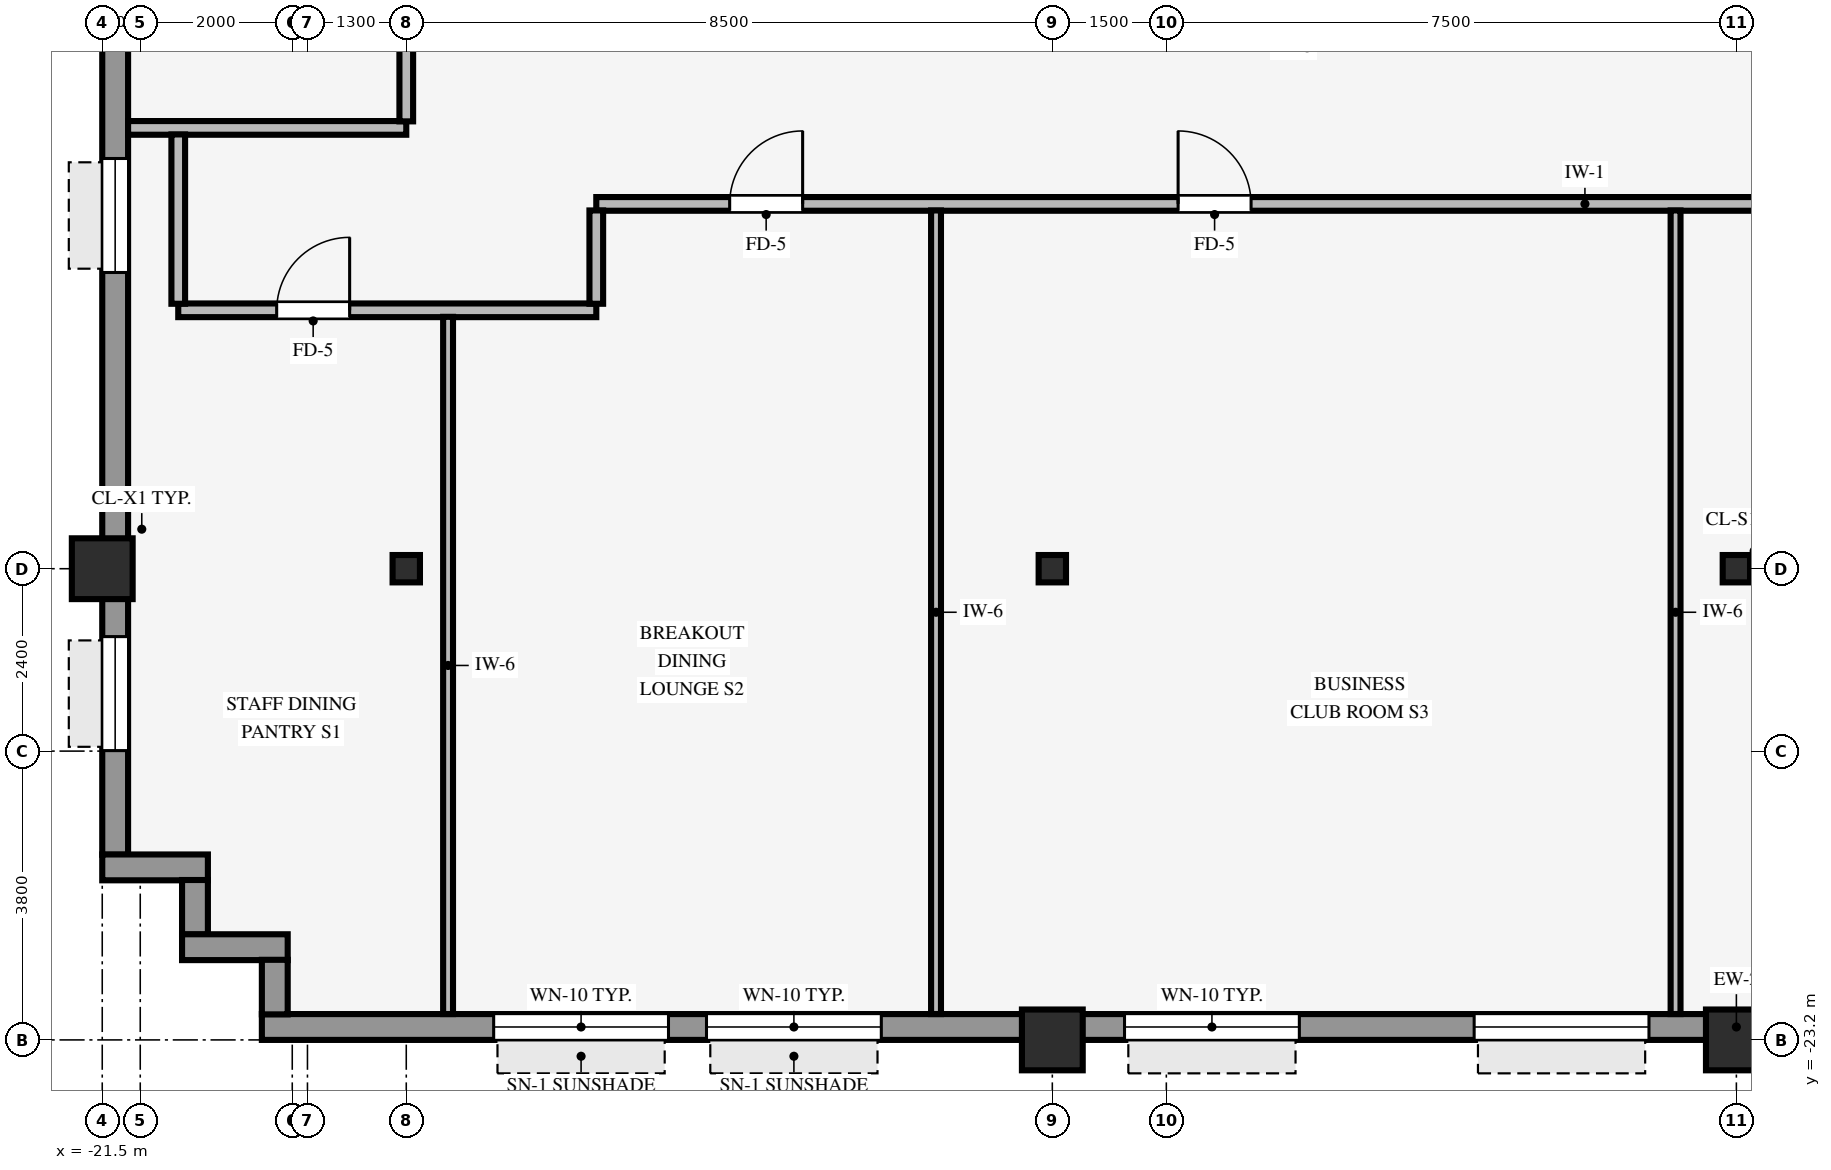
"""IFC4 building model, lengths in metres.
Left out: names, types, materials, properties, quantities, classifications, styles, units other than length and angle.
Written with IfcOpenShell. Run it as: python <this file> out.ifc"""

import sys

from ifc_helpers import new_model, si_unit, direction, frame, frame_2d, origin, origin_2d, place, context, subcontext, project, spatial, rectangle, hollow_rectangle, i_section, extrude, source, transform, mapped, element, fill, save


model = new_model("IFC4")
c1 = context("Model", 3, precision=1e-05, world=origin(), true_north=direction((0.0, 1.0)))
c2 = subcontext(c1, "Body", "Model", "MODEL_VIEW")
j1 = project(units=[si_unit("LENGTHUNIT", "METRE"), si_unit("PLANEANGLEUNIT", "RADIAN")], contexts=[c1])
p1 = place(None, origin())
s1 = spatial("IfcSite", under=j1, at=p1, CompositionType="ELEMENT")
p2 = place(p1, origin())
s2 = spatial("IfcBuilding", under=s1, at=p2, CompositionType="ELEMENT")
p3 = place(p2, frame((0.0, 0.0, 56.8)))
s3 = spatial("IfcBuildingStorey", under=s2, at=p3, CompositionType="ELEMENT", Elevation=56.8)
p4 = place(p3, frame((-21.5, -17.0, -0.4), z_axis=(0.0, 0.0, 1.0), x_axis=(1.0, 0.0, 0.0)))
e1 = element("IfcColumn", 1, at=p4, inside=s3, PredefinedType="COLUMN", context=c2, shape_type="SweptSolid", body=[
    extrude(hollow_rectangle(XDim=0.8, YDim=0.8, WallThickness=0.055, InnerFilletRadius=0.055, OuterFilletRadius=0.11, at=origin_2d()), origin(), (0.0, 0.0, 1.0), 3.77),
])
for number, where, z_axis, x_axis in (
    (2, (-9.0, -23.2, 0.0), (0.0, 0.0, 1.0), (1.0, 0.0, 0.0)),
    (3, (0.0, -23.2, 0.0), (0.0, 0.0, 1.0), (1.0, 0.0, 0.0)),
):
    element("IfcColumn", number, at=place(p3, frame(where, z_axis=z_axis, x_axis=x_axis)), inside=s3, PredefinedType="COLUMN", context=c2, shape_type="SweptSolid", body=[
        extrude(hollow_rectangle(XDim=0.8, YDim=0.8, WallThickness=0.055, InnerFilletRadius=0.055, OuterFilletRadius=0.11, at=origin_2d()), origin(), (0.0, 0.0, 1.0), 3.37),
    ])
for number, where, z_axis, x_axis in (
    (4, (0.0, -17.0, 0.0), (0.0, 0.0, 1.0), (1.0, 0.0, 0.0)),
    (5, (-17.5, -17.0, 0.0), (0.0, 0.0, 1.0), (1.0, 0.0, 0.0)),
    (6, (-9.0, -17.0, 0.0), (0.0, 0.0, 1.0), (1.0, 0.0, 0.0)),
):
    element("IfcColumn", number, at=place(p3, frame(where, z_axis=z_axis, x_axis=x_axis)), inside=s3, PredefinedType="COLUMN", context=c2, shape_type="SweptSolid", body=[
        extrude(i_section(OverallWidth=0.36, OverallDepth=0.36, WebThickness=0.021, FlangeThickness=0.021, FilletRadius=0.018, at=origin_2d()), origin(), (0.0, 0.0, 1.0), 3.37),
    ])
p5 = place(p3, frame((-19.4, -23.03, 0.0), z_axis=(0.0, 0.0, 1.0), x_axis=(1.0, 0.0, 0.0)))
e7 = element("IfcWall", 7, at=p5, inside=s3, PredefinedType="STANDARD", context=c2, shape_type="SweptSolid", body=[
    extrude(rectangle(XDim=38.8, YDim=0.34, at=frame_2d((19.4, 0.0))), origin(), (0.0, 0.0, 1.0), 2.705),
])
p6 = place(p5, frame((3.05, 0.0, 0.8)))
e8 = element("IfcOpeningElement", 8, at=p6, cuts=e7, PredefinedType="OPENING", context=c2, shape_type="SweptSolid", body=[
    extrude(rectangle(XDim=2.3, YDim=1.62, at=frame_2d((1.15, 0.81))), frame((0.0, 0.18, 0.0), z_axis=(0.0, -1.0, 0.0), x_axis=(1.0, 0.0, 0.0)), (0.0, 0.0, 1.0), 0.36),
])
p7 = place(p5, frame((5.85, 0.0, 0.8)))
e9 = element("IfcOpeningElement", 9, at=p7, cuts=e7, PredefinedType="OPENING", context=c2, shape_type="SweptSolid", body=[
    extrude(rectangle(XDim=2.3, YDim=1.62, at=frame_2d((1.15, 0.81))), frame((0.0, 0.18, 0.0), z_axis=(0.0, -1.0, 0.0), x_axis=(1.0, 0.0, 0.0)), (0.0, 0.0, 1.0), 0.36),
])
p8 = place(p5, frame((11.35, 0.0, 0.8)))
e10 = element("IfcOpeningElement", 10, at=p8, cuts=e7, PredefinedType="OPENING", context=c2, shape_type="SweptSolid", body=[
    extrude(rectangle(XDim=2.3, YDim=1.62, at=frame_2d((1.15, 0.81))), frame((0.0, 0.18, 0.0), z_axis=(0.0, -1.0, 0.0), x_axis=(1.0, 0.0, 0.0)), (0.0, 0.0, 1.0), 0.36),
])
p9 = place(p5, frame((15.95, 0.0, 0.8)))
e11 = element("IfcOpeningElement", 11, at=p9, cuts=e7, PredefinedType="OPENING", context=c2, shape_type="SweptSolid", body=[
    extrude(rectangle(XDim=2.3, YDim=1.62, at=frame_2d((1.15, 0.81))), frame((0.0, 0.18, 0.0), z_axis=(0.0, -1.0, 0.0), x_axis=(1.0, 0.0, 0.0)), (0.0, 0.0, 1.0), 0.36),
])
p10 = place(p5, frame((20.55, 0.0, 0.8)))
e12 = element("IfcOpeningElement", 12, at=p10, cuts=e7, PredefinedType="OPENING", context=c2, shape_type="SweptSolid", body=[
    extrude(rectangle(XDim=2.3, YDim=1.62, at=frame_2d((1.15, 0.81))), frame((0.0, 0.18, 0.0), z_axis=(0.0, -1.0, 0.0), x_axis=(1.0, 0.0, 0.0)), (0.0, 0.0, 1.0), 0.36),
])
p11 = place(p5, frame((30.65, 0.0, 0.8)))
e13 = element("IfcOpeningElement", 13, at=p11, cuts=e7, PredefinedType="OPENING", context=c2, shape_type="SweptSolid", body=[
    extrude(rectangle(XDim=2.3, YDim=1.62, at=frame_2d((1.15, 0.81))), frame((0.0, 0.18, 0.0), z_axis=(0.0, -1.0, 0.0), x_axis=(1.0, 0.0, 0.0)), (0.0, 0.0, 1.0), 0.36),
])
p12 = place(p5, frame((34.35, 0.0, 0.8)))
e14 = element("IfcOpeningElement", 14, at=p12, cuts=e7, PredefinedType="OPENING", context=c2, shape_type="SweptSolid", body=[
    extrude(rectangle(XDim=2.3, YDim=1.62, at=frame_2d((1.15, 0.81))), frame((0.0, 0.18, 0.0), z_axis=(0.0, -1.0, 0.0), x_axis=(1.0, 0.0, 0.0)), (0.0, 0.0, 1.0), 0.36),
])
p13 = place(p3, frame((-21.33, -20.764, 0.0), z_axis=(0.0, 0.0, 1.0), x_axis=(0.0, 1.0, 0.0)))
e15 = element("IfcWall", 15, at=p13, inside=s3, PredefinedType="STANDARD", context=c2, shape_type="SweptSolid", body=[
    extrude(rectangle(XDim=41.528, YDim=0.34, at=frame_2d((20.764, 0.0))), origin(), (0.0, 0.0, 1.0), 2.705),
])
p14 = place(p13, frame((15.464, 0.0, 0.0)))
e16 = element("IfcOpeningElement", 16, at=p14, cuts=e15, PredefinedType="OPENING", context=c2, shape_type="SweptSolid", body=[
    extrude(rectangle(XDim=0.98, YDim=2.15, at=frame_2d((0.49, 1.075))), frame((0.0, 0.18, 0.0), z_axis=(0.0, -1.0, 0.0), x_axis=(1.0, 0.0, 0.0)), (0.0, 0.0, 1.0), 0.36),
])
p15 = place(p13, frame((1.371, 0.0, 0.8)))
e17 = element("IfcOpeningElement", 17, at=p15, cuts=e15, PredefinedType="OPENING", context=c2, shape_type="SweptSolid", body=[
    extrude(rectangle(XDim=1.5, YDim=1.6, at=frame_2d((0.75, 0.8))), frame((0.0, 0.18, 0.0), z_axis=(0.0, -1.0, 0.0), x_axis=(1.0, 0.0, 0.0)), (0.0, 0.0, 1.0), 0.36),
])
p16 = place(p13, frame((7.662, 0.0, 0.8)))
e18 = element("IfcOpeningElement", 18, at=p16, cuts=e15, PredefinedType="OPENING", context=c2, shape_type="SweptSolid", body=[
    extrude(rectangle(XDim=1.5, YDim=1.6, at=frame_2d((0.75, 0.8))), frame((0.0, 0.18, 0.0), z_axis=(0.0, -1.0, 0.0), x_axis=(1.0, 0.0, 0.0)), (0.0, 0.0, 1.0), 0.36),
])
p17 = place(p13, frame((12.603, 0.0, 0.8)))
e19 = element("IfcOpeningElement", 19, at=p17, cuts=e15, PredefinedType="OPENING", context=c2, shape_type="SweptSolid", body=[
    extrude(rectangle(XDim=1.5, YDim=1.6, at=frame_2d((0.75, 0.8))), frame((0.0, 0.18, 0.0), z_axis=(0.0, -1.0, 0.0), x_axis=(1.0, 0.0, 0.0)), (0.0, 0.0, 1.0), 0.36),
])
p18 = place(p13, frame((17.543, 0.0, 0.8)))
e20 = element("IfcOpeningElement", 20, at=p18, cuts=e15, PredefinedType="OPENING", context=c2, shape_type="SweptSolid", body=[
    extrude(rectangle(XDim=1.5, YDim=1.6, at=frame_2d((0.75, 0.8))), frame((0.0, 0.18, 0.0), z_axis=(0.0, -1.0, 0.0), x_axis=(1.0, 0.0, 0.0)), (0.0, 0.0, 1.0), 0.36),
])
p19 = place(p13, frame((22.485, 0.0, 0.8)))
e21 = element("IfcOpeningElement", 21, at=p19, cuts=e15, PredefinedType="OPENING", context=c2, shape_type="SweptSolid", body=[
    extrude(rectangle(XDim=1.5, YDim=1.6, at=frame_2d((0.75, 0.8))), frame((0.0, 0.18, 0.0), z_axis=(0.0, -1.0, 0.0), x_axis=(1.0, 0.0, 0.0)), (0.0, 0.0, 1.0), 0.36),
])
p20 = place(p13, frame((27.426, 0.0, 0.8)))
e22 = element("IfcOpeningElement", 22, at=p20, cuts=e15, PredefinedType="OPENING", context=c2, shape_type="SweptSolid", body=[
    extrude(rectangle(XDim=1.5, YDim=1.6, at=frame_2d((0.75, 0.8))), frame((0.0, 0.18, 0.0), z_axis=(0.0, -1.0, 0.0), x_axis=(1.0, 0.0, 0.0)), (0.0, 0.0, 1.0), 0.36),
])
p21 = place(p13, frame((32.366, 0.0, 0.8)))
e23 = element("IfcOpeningElement", 23, at=p21, cuts=e15, PredefinedType="OPENING", context=c2, shape_type="SweptSolid", body=[
    extrude(rectangle(XDim=1.5, YDim=1.6, at=frame_2d((0.75, 0.8))), frame((0.0, 0.18, 0.0), z_axis=(0.0, -1.0, 0.0), x_axis=(1.0, 0.0, 0.0)), (0.0, 0.0, 1.0), 0.36),
])
p22 = place(p13, frame((38.657, 0.0, 0.8)))
e24 = element("IfcOpeningElement", 24, at=p22, cuts=e15, PredefinedType="OPENING", context=c2, shape_type="SweptSolid", body=[
    extrude(rectangle(XDim=1.5, YDim=1.6, at=frame_2d((0.75, 0.8))), frame((0.0, 0.18, 0.0), z_axis=(0.0, -1.0, 0.0), x_axis=(1.0, 0.0, 0.0)), (0.0, 0.0, 1.0), 0.36),
])
p23 = place(p3, frame((-21.5, -20.93, 0.0), z_axis=(0.0, 0.0, 1.0), x_axis=(1.0, 0.0, 0.0)))
e25 = element("IfcWall", 25, at=p23, inside=s3, PredefinedType="STANDARD", context=c2, shape_type="SweptSolid", body=[
    extrude(rectangle(XDim=1.39, YDim=0.34, at=frame_2d((0.695, 0.0))), origin(), (0.0, 0.0, 1.0), 3.36),
])
p24 = place(p3, frame((-20.28, -21.814, 0.0), z_axis=(0.0, 0.0, 1.0), x_axis=(0.0, 1.0, 0.0)))
e26 = element("IfcWall", 26, at=p24, inside=s3, PredefinedType="STANDARD", context=c2, shape_type="SweptSolid", body=[
    extrude(rectangle(XDim=0.718, YDim=0.34, at=frame_2d((0.359, 0.0))), origin(), (0.0, 0.0, 1.0), 3.36),
])
p25 = place(p3, frame((-20.45, -21.98, 0.0), z_axis=(0.0, 0.0, 1.0), x_axis=(1.0, 0.0, 0.0)))
e27 = element("IfcWall", 27, at=p25, inside=s3, PredefinedType="STANDARD", context=c2, shape_type="SweptSolid", body=[
    extrude(rectangle(XDim=1.39, YDim=0.34, at=frame_2d((0.695, 0.0))), origin(), (0.0, 0.0, 1.0), 3.36),
])
p26 = place(p3, frame((-19.23, -22.864, 0.0), z_axis=(0.0, 0.0, 1.0), x_axis=(0.0, 1.0, 0.0)))
e28 = element("IfcWall", 28, at=p26, inside=s3, PredefinedType="STANDARD", context=c2, shape_type="SweptSolid", body=[
    extrude(rectangle(XDim=0.718, YDim=0.34, at=frame_2d((0.359, 0.0))), origin(), (0.0, 0.0, 1.0), 3.36),
])
p27 = place(p3, frame((-20.5, -13.6, 0.0), z_axis=(0.0, 0.0, 1.0), x_axis=(1.0, 0.0, 0.0)))
e29 = element("IfcWall", 29, at=p27, inside=s3, PredefinedType="PARTITIONING", context=c2, shape_type="SweptSolid", body=[
    extrude(rectangle(XDim=5.5, YDim=0.18, at=frame_2d((2.75, 0.0))), origin(), (0.0, 0.0, 1.0), 2.942),
])
p28 = place(p27, frame((1.295, 0.0, 0.0)))
e30 = element("IfcOpeningElement", 30, at=p28, cuts=e29, PredefinedType="OPENING", context=c2, shape_type="SweptSolid", body=[
    extrude(rectangle(XDim=0.96, YDim=2.1, at=frame_2d((0.48, 1.05))), frame((0.0, 0.1, 0.0), z_axis=(0.0, -1.0, 0.0), x_axis=(1.0, 0.0, 0.0)), (0.0, 0.0, 1.0), 0.2),
])
p29 = place(p3, frame((-15.0, -12.2, 0.0), z_axis=(0.0, 0.0, 1.0), x_axis=(1.0, 0.0, 0.0)))
e31 = element("IfcWall", 31, at=p29, inside=s3, PredefinedType="PARTITIONING", context=c2, shape_type="SweptSolid", body=[
    extrude(rectangle(XDim=30.0, YDim=0.18, at=frame_2d((15.0, 0.0))), origin(), (0.0, 0.0, 1.0), 3.36),
])
p30 = place(p29, frame((17.4, 0.0, 0.0)))
e32 = element("IfcOpeningElement", 32, at=p30, cuts=e31, PredefinedType="OPENING", context=c2, shape_type="SweptSolid", body=[
    extrude(rectangle(XDim=0.96, YDim=2.1, at=frame_2d((0.48, 1.05))), frame((0.0, 0.1, 0.0), z_axis=(0.0, -1.0, 0.0), x_axis=(1.0, 0.0, 0.0)), (0.0, 0.0, 1.0), 0.2),
])
p31 = place(p29, frame((7.655, 0.0, 0.0)))
e33 = element("IfcOpeningElement", 33, at=p31, cuts=e31, PredefinedType="OPENING", context=c2, shape_type="SweptSolid", body=[
    extrude(rectangle(XDim=0.96, YDim=2.1, at=frame_2d((0.48, 1.05))), frame((0.0, 0.1, 0.0), z_axis=(0.0, -1.0, 0.0), x_axis=(1.0, 0.0, 0.0)), (0.0, 0.0, 1.0), 0.2),
])
p32 = place(p29, frame((1.755, 0.0, 0.0)))
e34 = element("IfcOpeningElement", 34, at=p32, cuts=e31, PredefinedType="OPENING", context=c2, shape_type="SweptSolid", body=[
    extrude(rectangle(XDim=0.96, YDim=2.1, at=frame_2d((0.48, 1.05))), frame((0.0, 0.1, 0.0), z_axis=(0.0, -1.0, 0.0), x_axis=(1.0, 0.0, 0.0)), (0.0, 0.0, 1.0), 0.2),
])
p33 = place(p29, frame((27.1, 0.0, 0.0)))
e35 = element("IfcOpeningElement", 35, at=p33, cuts=e31, PredefinedType="OPENING", context=c2, shape_type="SweptSolid", body=[
    extrude(rectangle(XDim=0.96, YDim=2.1, at=frame_2d((0.48, 1.05))), frame((0.0, 0.1, 0.0), z_axis=(0.0, -1.0, 0.0), x_axis=(1.0, 0.0, 0.0)), (0.0, 0.0, 1.0), 0.2),
])
p34 = place(p29, frame((23.085, 0.0, 0.0)))
e36 = element("IfcOpeningElement", 36, at=p34, cuts=e31, PredefinedType="OPENING", context=c2, shape_type="SweptSolid", body=[
    extrude(rectangle(XDim=0.96, YDim=2.1, at=frame_2d((0.48, 1.05))), frame((0.0, 0.1, 0.0), z_axis=(0.0, -1.0, 0.0), x_axis=(1.0, 0.0, 0.0)), (0.0, 0.0, 1.0), 0.2),
])
p35 = place(p3, frame((-21.16, -11.2, 0.0), z_axis=(0.0, 0.0, 1.0), x_axis=(1.0, 0.0, 0.0)))
e37 = element("IfcWall", 37, at=p35, inside=s3, PredefinedType="PARTITIONING", context=c2, shape_type="SweptSolid", body=[
    extrude(rectangle(XDim=3.66, YDim=0.18, at=frame_2d((1.83, 0.0))), origin(), (0.0, 0.0, 1.0), 3.36),
])
p36 = place(p3, frame((-20.5, -13.514, 0.0), z_axis=(0.0, 0.0, 1.0), x_axis=(0.0, 1.0, 0.0)))
e38 = element("IfcWall", 38, at=p36, inside=s3, PredefinedType="PARTITIONING", context=c2, shape_type="SweptSolid", body=[
    extrude(rectangle(XDim=2.228, YDim=0.18, at=frame_2d((1.114, 0.0))), origin(), (0.0, 0.0, 1.0), 3.36),
])
p37 = place(p3, frame((-17.5, -11.114, 0.0), z_axis=(0.0, 0.0, 1.0), x_axis=(0.0, 1.0, 0.0)))
e39 = element("IfcWall", 39, at=p37, inside=s3, PredefinedType="PARTITIONING", context=c2, shape_type="SweptSolid", body=[
    extrude(rectangle(XDim=0.968, YDim=0.18, at=frame_2d((0.484, 0.0))), origin(), (0.0, 0.0, 1.0), 2.738),
])
p38 = place(p3, frame((-16.95, -22.86, 0.0), z_axis=(0.0, 0.0, 1.0), x_axis=(0.0, 1.0, 0.0)))
e40 = element("IfcWall", 40, at=p38, inside=s3, PredefinedType="PARTITIONING", context=c2, shape_type="SweptSolid", body=[
    extrude(rectangle(XDim=9.174, YDim=0.13, at=frame_2d((4.587, 0.0))), origin(), (0.0, 0.0, 1.0), 3.36),
])
p39 = place(p3, frame((-15.0, -13.514, 0.0), z_axis=(0.0, 0.0, 1.0), x_axis=(0.0, 1.0, 0.0)))
e41 = element("IfcWall", 41, at=p39, inside=s3, PredefinedType="PARTITIONING", context=c2, shape_type="SweptSolid", body=[
    extrude(rectangle(XDim=1.228, YDim=0.18, at=frame_2d((0.614, 0.0))), origin(), (0.0, 0.0, 1.0), 3.36),
])
for number, where, z_axis, x_axis in (
    (42, (-10.53, -22.86, 0.0), (0.0, 0.0, 1.0), (0.0, 1.0, 0.0)),
    (43, (-0.8, -22.86, 0.0), (0.0, 0.0, 1.0), (0.0, 1.0, 0.0)),
):
    element("IfcWall", number, at=place(p3, frame(where, z_axis=z_axis, x_axis=x_axis)), inside=s3, PredefinedType="PARTITIONING", context=c2, shape_type="SweptSolid", body=[
        extrude(rectangle(XDim=10.574, YDim=0.13, at=frame_2d((5.287, 0.0))), origin(), (0.0, 0.0, 1.0), 3.36),
    ])
m1 = source(origin(), c2, "Body", "SweptSolid", [
    extrude(rectangle(XDim=2.3, YDim=1.62, at=frame_2d((1.15, 0.81))), frame((0.0, 0.03, 0.0), z_axis=(0.0, -1.0, 0.0), x_axis=(1.0, 0.0, 0.0)), (0.0, 0.0, 1.0), 0.06),
])
p40 = place(p6, origin())
e44 = element("IfcWindow", 44, at=p40, inside=s3, PartitioningType="SINGLE_PANEL", PredefinedType="WINDOW", context=c2, shape_type="MappedRepresentation", body=[
    mapped(m1, transform((0.0, 0.0, 0.0), scale=1.0)),
])
fill(e8, e44)
p41 = place(p7, origin())
e45 = element("IfcWindow", 45, at=p41, inside=s3, PartitioningType="SINGLE_PANEL", PredefinedType="WINDOW", context=c2, shape_type="MappedRepresentation", body=[
    mapped(m1, transform((0.0, 0.0, 0.0), scale=1.0)),
])
fill(e9, e45)
p42 = place(p8, origin())
e46 = element("IfcWindow", 46, at=p42, inside=s3, PartitioningType="SINGLE_PANEL", PredefinedType="WINDOW", context=c2, shape_type="MappedRepresentation", body=[
    mapped(m1, transform((0.0, 0.0, 0.0), scale=1.0)),
])
fill(e10, e46)
p43 = place(p9, origin())
e47 = element("IfcWindow", 47, at=p43, inside=s3, PartitioningType="SINGLE_PANEL", PredefinedType="WINDOW", context=c2, shape_type="MappedRepresentation", body=[
    mapped(m1, transform((0.0, 0.0, 0.0), scale=1.0)),
])
fill(e11, e47)
m2 = source(origin(), c2, "Body", "SweptSolid", [
    extrude(rectangle(XDim=1.5, YDim=1.6, at=frame_2d((0.75, 0.8))), frame((0.0, 0.03, 0.0), z_axis=(0.0, -1.0, 0.0), x_axis=(1.0, 0.0, 0.0)), (0.0, 0.0, 1.0), 0.06),
])
p44 = place(p15, origin())
e48 = element("IfcWindow", 48, at=p44, inside=s3, PartitioningType="SINGLE_PANEL", PredefinedType="WINDOW", context=c2, shape_type="MappedRepresentation", body=[
    mapped(m2, transform((0.0, 0.0, 0.0), scale=1.0)),
])
fill(e17, e48)
p45 = place(p16, origin())
e49 = element("IfcWindow", 49, at=p45, inside=s3, PartitioningType="SINGLE_PANEL", PredefinedType="WINDOW", context=c2, shape_type="MappedRepresentation", body=[
    mapped(m2, transform((0.0, 0.0, 0.0), scale=1.0)),
])
fill(e18, e49)
m3 = source(origin(), c2, "Body", "SweptSolid", [
    extrude(rectangle(XDim=0.96, YDim=2.1, at=frame_2d((0.48, 1.05))), frame((0.0, 0.025, 0.0), z_axis=(0.0, -1.0, 0.0), x_axis=(1.0, 0.0, 0.0)), (0.0, 0.0, 1.0), 0.05),
])
p46 = place(p31, origin())
e50 = element("IfcDoor", 50, at=p46, inside=s3, OperationType="SINGLE_SWING_LEFT", PredefinedType="DOOR", context=c2, shape_type="MappedRepresentation", body=[
    mapped(m3, transform((0.0, 0.0, 0.0), scale=1.0)),
])
fill(e33, e50)
p47 = place(p32, origin())
e51 = element("IfcDoor", 51, at=p47, inside=s3, OperationType="SINGLE_SWING_RIGHT", PredefinedType="DOOR", context=c2, shape_type="MappedRepresentation", body=[
    mapped(m3, transform((0.0, 0.0, 0.0), scale=1.0)),
])
fill(e34, e51)
p48 = place(p28, origin())
e52 = element("IfcDoor", 52, at=p48, inside=s3, OperationType="SINGLE_SWING_RIGHT", PredefinedType="DOOR", context=c2, shape_type="MappedRepresentation", body=[
    mapped(m3, transform((0.0, 0.0, 0.0), scale=1.0)),
])
fill(e30, e52)
save(model, sys.argv[1])
